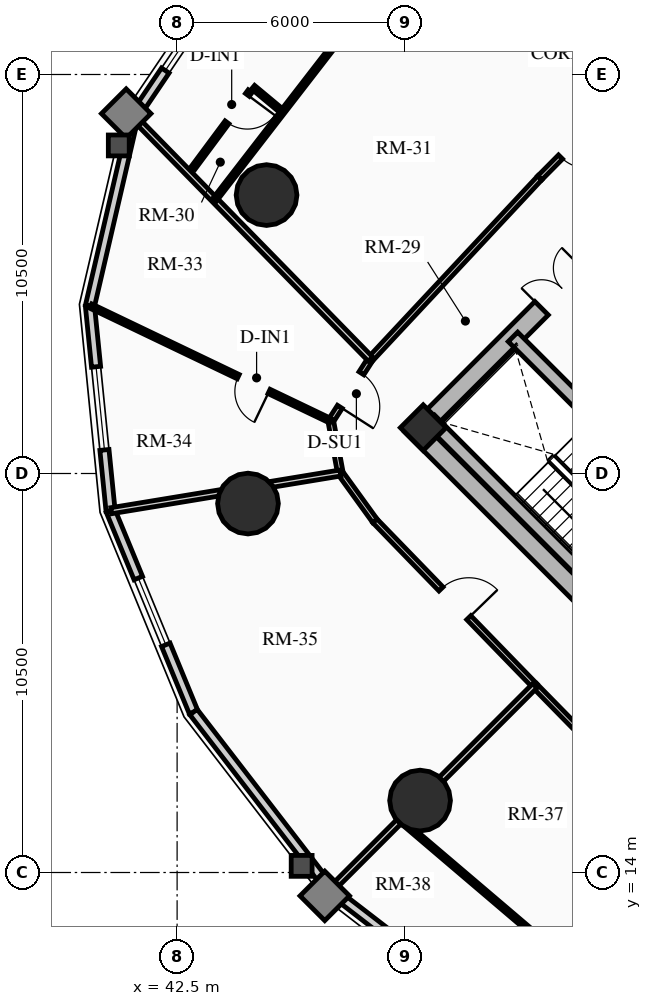
"""IFC4 building model, lengths in metres.
Left out: names, types, materials, properties, quantities, classifications, styles, units other than length and angle.
Written with IfcOpenShell. Run it as: python <this file> out.ifc"""

import sys

from ifc_helpers import new_model, si_unit, direction, frame, frame_2d, origin, origin_2d, place, context, subcontext, project, spatial, rectangle, circle, extrude, source, transform, mapped, element, fill, save


model = new_model("IFC4")
c1 = context("Model", 3, precision=1e-05, world=origin(), true_north=direction((0.0, 1.0)))
c2 = subcontext(c1, "Body", "Model", "MODEL_VIEW")
j1 = project(units=[si_unit("LENGTHUNIT", "METRE"), si_unit("PLANEANGLEUNIT", "RADIAN")], contexts=[c1])
p1 = place(None, origin())
s1 = spatial("IfcSite", under=j1, at=p1, CompositionType="ELEMENT")
p2 = place(p1, origin())
s2 = spatial("IfcBuilding", under=s1, at=p2, CompositionType="ELEMENT")
p3 = place(p2, frame((0.0, 0.0, 39.46)))
s3 = spatial("IfcBuildingStorey", under=s2, at=p3, CompositionType="ELEMENT", Elevation=39.46)
p4 = place(p3, frame((58.773, 15.661, 0.0), z_axis=(0.0, 0.0, 1.0), x_axis=(-0.707106781187, 0.707106781187, 0.0)))
e1 = element("IfcWall", 1, at=p4, inside=s3, PredefinedType="SHEAR", context=c2, shape_type="SweptSolid", body=[
    extrude(rectangle(XDim=14.3, YDim=0.5, at=frame_2d((7.15, 0.0))), origin(), (0.0, 0.0, 1.0), 2.91),
])
p5 = place(p3, frame((48.838, 25.596, 0.0), z_axis=(0.0, 0.0, 1.0), x_axis=(0.707106781187, 0.707106781187, 0.0)))
e2 = element("IfcWall", 2, at=p5, inside=s3, PredefinedType="SHEAR", context=c2, shape_type="SweptSolid", body=[
    extrude(rectangle(XDim=10.7, YDim=0.5, at=frame_2d((5.35, 0.0))), origin(), (0.0, 0.0, 1.0), 2.91),
])
m1 = source(origin(), c2, "Body", "SweptSolid", [
    extrude(rectangle(XDim=1.5, YDim=2.02, at=frame_2d((0.75, 1.01))), frame((0.0, 0.26, 0.0), z_axis=(0.0, -1.0, 0.0), x_axis=(1.0, 0.0, 0.0)), (0.0, 0.0, 1.0), 0.52),
])
p6 = place(p5, frame((4.6, 0.0, 0.0)))
e3 = element("IfcOpeningElement", 3, at=p6, cuts=e2, PredefinedType="OPENING", context=c2, shape_type="MappedRepresentation", body=[
    mapped(m1, transform((0.0, 0.0, 0.0), x_axis=(1.0, 0.0, 0.0), y_axis=(0.0, 1.0, 0.0), z_axis=(0.0, 0.0, 1.0), scale=1.0)),
])
p7 = place(p3, frame((61.096, 18.338, 0.0), z_axis=(0.0, 0.0, 1.0), x_axis=(-0.707106781187, 0.707106781187, 0.0)))
e4 = element("IfcWall", 4, at=p7, inside=s3, PredefinedType="SHEAR", context=c2, shape_type="SweptSolid", body=[
    extrude(rectangle(XDim=13.8, YDim=0.35, at=frame_2d((6.9, 0.0))), origin(), (0.0, 0.0, 1.0), 2.91),
])
m2 = source(origin(), c2, "Body", "SweptSolid", [
    extrude(rectangle(XDim=1.1, YDim=2.015, at=frame_2d((0.55, 1.007))), frame((0.0, 0.185, 0.0), z_axis=(0.0, -1.0, 0.0), x_axis=(1.0, 0.0, 0.0)), (0.0, 0.0, 1.0), 0.37),
])
p8 = place(p7, frame((4.9, 0.0, 0.0)))
e5 = element("IfcOpeningElement", 5, at=p8, cuts=e4, PredefinedType="OPENING", context=c2, shape_type="MappedRepresentation", body=[
    mapped(m2, transform((0.0, 0.0, 0.0), x_axis=(1.0, 0.0, 0.0), y_axis=(0.0, 1.0, 0.0), z_axis=(0.0, 0.0, 1.0), scale=1.0)),
])
m3 = source(origin(), c2, "Body", "SweptSolid", [
    extrude(rectangle(XDim=1.15, YDim=2.02, at=frame_2d((0.575, 1.01))), frame((0.0, 0.185, 0.0), z_axis=(0.0, -1.0, 0.0), x_axis=(1.0, 0.0, 0.0)), (0.0, 0.0, 1.0), 0.37),
])
p9 = place(p7, frame((7.32, 0.0, 0.0)))
e6 = element("IfcOpeningElement", 6, at=p9, cuts=e4, PredefinedType="OPENING", context=c2, shape_type="MappedRepresentation", body=[
    mapped(m3, transform((0.0, 0.0, 0.0), x_axis=(1.0, 0.0, 0.0), y_axis=(0.0, 1.0, 0.0), z_axis=(0.0, 0.0, 1.0), scale=1.0)),
])
p10 = place(p3, frame((53.922, 21.141, 0.0), z_axis=(0.0, 0.0, 1.0), x_axis=(-0.707106781187, 0.707106781187, 0.0)))
e7 = element("IfcWall", 7, at=p10, inside=s3, PredefinedType="SHEAR", context=c2, shape_type="SweptSolid", body=[
    extrude(rectangle(XDim=6.745, YDim=0.35, at=frame_2d((3.373, 0.0))), origin(), (0.0, 0.0, 1.0), 2.91),
])
p11 = place(p3, frame((48.976, 25.706, 0.0), z_axis=(0.0, 0.0, 1.0), x_axis=(0.707106781187, 0.707106781187, 0.0)))
e8 = element("IfcColumn", 8, at=p11, inside=s3, PredefinedType="COLUMN", context=c2, shape_type="SweptSolid", body=[
    extrude(rectangle(XDim=0.85, YDim=0.85, at=origin_2d()), origin(), (0.0, 0.0, 1.0), 2.91),
])
for number, where, z_axis, x_axis in (
    (9, (44.854, 31.827, 0.0), (0.0, 0.0, 1.0), (1.0, 0.0, 0.0)),
    (10, (44.365, 23.709, 0.0), (0.0, 0.0, 1.0), (1.0, 0.0, 0.0)),
    (11, (48.893, 15.893, 0.0), (0.0, 0.0, 1.0), (1.0, 0.0, 0.0)),
):
    element("IfcColumn", number, at=place(p3, frame(where, z_axis=z_axis, x_axis=x_axis)), inside=s3, PredefinedType="USERDEFINED", context=c2, shape_type="SweptSolid", body=[
        extrude(circle(Radius=0.8, at=origin_2d()), origin(), (0.0, 0.0, 1.0), 2.91),
    ])
p12 = place(p3, frame((41.356, 33.871, 0.0), z_axis=(0.0, 0.0, 1.0), x_axis=(0.559621532896, 0.828748297084, 0.0)))
e12 = element("IfcWall", 12, at=p12, inside=s3, PredefinedType="SOLIDWALL", context=c2, shape_type="SweptSolid", body=[
    extrude(rectangle(XDim=4.879, YDim=0.24, at=frame_2d((2.439, 0.0))), origin(), (0.0, 0.0, 1.0), 2.073),
])
m4 = source(origin(), c2, "Body", "SweptSolid", [
    extrude(rectangle(XDim=1.9, YDim=1.35, at=frame_2d((0.95, 0.675))), frame((0.0, 0.13, 0.0), z_axis=(0.0, -1.0, 0.0), x_axis=(1.0, 0.0, 0.0)), (0.0, 0.0, 1.0), 0.26),
])
p13 = place(p12, frame((1.489, 0.0, 0.65)))
e13 = element("IfcOpeningElement", 13, at=p13, cuts=e12, PredefinedType="OPENING", context=c2, shape_type="MappedRepresentation", body=[
    mapped(m4, transform((0.0, 0.0, 0.0), x_axis=(1.0, 0.0, 0.0), y_axis=(0.0, 1.0, 0.0), z_axis=(0.0, 0.0, 1.0), scale=1.0)),
])
p14 = place(p3, frame((40.206, 28.91, 0.0), z_axis=(0.0, 0.0, 1.0), x_axis=(0.22582585901, 0.974167686491, 0.0)))
e14 = element("IfcWall", 14, at=p14, inside=s3, PredefinedType="SOLIDWALL", context=c2, shape_type="SweptSolid", body=[
    extrude(rectangle(XDim=5.092, YDim=0.24, at=frame_2d((2.546, 0.0))), origin(), (0.0, 0.0, 1.0), 2.073),
])
p15 = place(p3, frame((40.749, 23.518, 0.0), z_axis=(0.0, 0.0, 1.0), x_axis=(-0.100190592135, 0.994968263437, 0.0)))
e15 = element("IfcWall", 15, at=p15, inside=s3, PredefinedType="SOLIDWALL", context=c2, shape_type="SweptSolid", body=[
    extrude(rectangle(XDim=5.419, YDim=0.24, at=frame_2d((2.71, 0.0))), origin(), (0.0, 0.0, 1.0), 2.073),
])
m5 = source(origin(), c2, "Body", "SweptSolid", [
    extrude(rectangle(XDim=2.2, YDim=1.35, at=frame_2d((1.1, 0.675))), frame((0.0, 0.13, 0.0), z_axis=(0.0, -1.0, 0.0), x_axis=(1.0, 0.0, 0.0)), (0.0, 0.0, 1.0), 0.26),
])
p16 = place(p15, frame((1.61, 0.0, 0.65)))
e16 = element("IfcOpeningElement", 16, at=p16, cuts=e15, PredefinedType="OPENING", context=c2, shape_type="MappedRepresentation", body=[
    mapped(m5, transform((0.0, 0.0, 0.0), x_axis=(1.0, 0.0, 0.0), y_axis=(0.0, 1.0, 0.0), z_axis=(0.0, 0.0, 1.0), scale=1.0)),
])
p17 = place(p3, frame((42.932, 18.222, 0.0), z_axis=(0.0, 0.0, 1.0), x_axis=(-0.381077764176, 0.924542988536, 0.0)))
e17 = element("IfcWall", 17, at=p17, inside=s3, PredefinedType="SOLIDWALL", context=c2, shape_type="SweptSolid", body=[
    extrude(rectangle(XDim=5.728, YDim=0.24, at=frame_2d((2.864, 0.0))), origin(), (0.0, 0.0, 1.0), 2.073),
])
p18 = place(p17, frame((1.914, 0.0, 0.65)))
e18 = element("IfcOpeningElement", 18, at=p18, cuts=e17, PredefinedType="OPENING", context=c2, shape_type="MappedRepresentation", body=[
    mapped(m4, transform((0.0, 0.0, 0.0), x_axis=(1.0, 0.0, 0.0), y_axis=(0.0, 1.0, 0.0), z_axis=(0.0, 0.0, 1.0), scale=1.0)),
])
p19 = place(p3, frame((46.541, 13.541, 0.0), z_axis=(0.0, 0.0, 1.0), x_axis=(-0.610494906082, 0.792020182601, 0.0)))
e19 = element("IfcWall", 19, at=p19, inside=s3, PredefinedType="SOLIDWALL", context=c2, shape_type="SweptSolid", body=[
    extrude(rectangle(XDim=5.911, YDim=0.24, at=frame_2d((2.956, 0.0))), origin(), (0.0, 0.0, 1.0), 2.073),
])
p20 = place(p3, frame((51.222, 9.932, 0.0), z_axis=(0.0, 0.0, 1.0), x_axis=(-0.792020182601, 0.610494906082, 0.0)))
e20 = element("IfcWall", 20, at=p20, inside=s3, PredefinedType="SOLIDWALL", context=c2, shape_type="SweptSolid", body=[
    extrude(rectangle(XDim=5.911, YDim=0.24, at=frame_2d((2.956, 0.0))), origin(), (0.0, 0.0, 1.0), 2.073),
])
p21 = place(p20, frame((1.855, 0.0, 0.65)))
e21 = element("IfcOpeningElement", 21, at=p21, cuts=e20, PredefinedType="OPENING", context=c2, shape_type="MappedRepresentation", body=[
    mapped(m5, transform((0.0, 0.0, 0.0), x_axis=(1.0, 0.0, 0.0), y_axis=(0.0, 1.0, 0.0), z_axis=(0.0, 0.0, 1.0), scale=1.0)),
])
p22 = place(p3, frame((54.427, 34.683, 0.0), z_axis=(0.0, 0.0, 1.0), x_axis=(-0.704178989986, -0.710022499687, 0.0)))
e22 = element("IfcWall", 22, at=p22, inside=s3, PredefinedType="PARTITIONING", context=c2, shape_type="SweptSolid", body=[
    extrude(rectangle(XDim=3.384, YDim=0.15, at=frame_2d((1.692, 0.0))), origin(), (0.0, 0.0, 1.0), 2.159),
])
m6 = source(origin(), c2, "Body", "SweptSolid", [
    extrude(rectangle(XDim=1.05, YDim=2.015, at=frame_2d((0.525, 1.007))), frame((0.0, 0.085, 0.0), z_axis=(0.0, -1.0, 0.0), x_axis=(1.0, 0.0, 0.0)), (0.0, 0.0, 1.0), 0.17),
])
p23 = place(p22, frame((1.56, 0.0, 0.0)))
e23 = element("IfcOpeningElement", 23, at=p23, cuts=e22, PredefinedType="OPENING", context=c2, shape_type="MappedRepresentation", body=[
    mapped(m6, transform((0.0, 0.0, 0.0), x_axis=(1.0, 0.0, 0.0), y_axis=(0.0, 1.0, 0.0), z_axis=(0.0, 0.0, 1.0), scale=1.0)),
])
p24 = place(p3, frame((52.043, 32.28, 0.0), z_axis=(0.0, 0.0, 1.0), x_axis=(-0.682606081633, -0.730786519661, 0.0)))
e24 = element("IfcWall", 24, at=p24, inside=s3, PredefinedType="PARTITIONING", context=c2, shape_type="SweptSolid", body=[
    extrude(rectangle(XDim=6.527, YDim=0.15, at=frame_2d((3.263, 0.0))), origin(), (0.0, 0.0, 1.0), 2.159),
])
p25 = place(p3, frame((47.588, 27.51, 0.0), z_axis=(0.0, 0.0, 1.0), x_axis=(-0.540202619347, -0.841534984449, 0.0)))
e25 = element("IfcWall", 25, at=p25, inside=s3, PredefinedType="PARTITIONING", context=c2, shape_type="SweptSolid", body=[
    extrude(rectangle(XDim=1.935, YDim=0.15, at=frame_2d((0.967, 0.0))), origin(), (0.0, 0.0, 1.0), 2.159),
])
p26 = place(p25, frame((0.442, 0.0, 0.0)))
e26 = element("IfcOpeningElement", 26, at=p26, cuts=e25, PredefinedType="OPENING", context=c2, shape_type="MappedRepresentation", body=[
    mapped(m6, transform((0.0, 0.0, 0.0), x_axis=(1.0, 0.0, 0.0), y_axis=(0.0, 1.0, 0.0), z_axis=(0.0, 0.0, 1.0), scale=1.0)),
])
p27 = place(p3, frame((46.543, 25.882, 0.0), z_axis=(0.0, 0.0, 1.0), x_axis=(0.181153502579, -0.983454832976, 0.0)))
e27 = element("IfcWall", 27, at=p27, inside=s3, PredefinedType="PARTITIONING", context=c2, shape_type="SweptSolid", body=[
    extrude(rectangle(XDim=1.392, YDim=0.15, at=frame_2d((0.696, 0.0))), origin(), (0.0, 0.0, 1.0), 2.159),
])
p28 = place(p3, frame((46.795, 24.513, 0.0), z_axis=(0.0, 0.0, 1.0), x_axis=(0.585628197524, -0.810579801294, 0.0)))
e28 = element("IfcWall", 28, at=p28, inside=s3, PredefinedType="PARTITIONING", context=c2, shape_type="SweptSolid", body=[
    extrude(rectangle(XDim=1.554, YDim=0.15, at=frame_2d((0.777, 0.0))), origin(), (0.0, 0.0, 1.0), 2.205),
])
p29 = place(p3, frame((47.706, 23.253, 0.0), z_axis=(0.0, 0.0, 1.0), x_axis=(0.696179266346, -0.717867974707, 0.0)))
e29 = element("IfcWall", 29, at=p29, inside=s3, PredefinedType="PARTITIONING", context=c2, shape_type="SweptSolid", body=[
    extrude(rectangle(XDim=6.045, YDim=0.15, at=frame_2d((3.022, 0.0))), origin(), (0.0, 0.0, 1.0), 2.635),
])
p30 = place(p29, frame((2.497, 0.0, 0.0)))
e30 = element("IfcOpeningElement", 30, at=p30, cuts=e29, PredefinedType="OPENING", context=c2, shape_type="MappedRepresentation", body=[
    mapped(m6, transform((0.0, 0.0, 0.0), x_axis=(1.0, 0.0, 0.0), y_axis=(0.0, 1.0, 0.0), z_axis=(0.0, 0.0, 1.0), scale=1.0)),
])
p31 = place(p3, frame((51.914, 18.914, 0.0), z_axis=(0.0, 0.0, 1.0), x_axis=(0.699999313799, -0.714143515465, 0.0)))
e31 = element("IfcWall", 31, at=p31, inside=s3, PredefinedType="PARTITIONING", context=c2, shape_type="SweptSolid", body=[
    extrude(rectangle(XDim=6.162, YDim=0.15, at=frame_2d((3.081, 0.0))), origin(), (0.0, 0.0, 1.0), 2.159),
])
p32 = place(p3, frame((47.588, 27.51, 0.0), z_axis=(0.0, 0.0, 1.0), x_axis=(-0.699371977892, 0.714757886657, 0.0)))
e32 = element("IfcWall", 32, at=p32, inside=s3, PredefinedType="PARTITIONING", context=c2, shape_type="SweptSolid", body=[
    extrude(rectangle(XDim=8.886, YDim=0.16, at=frame_2d((4.443, 0.0))), origin(), (0.0, 0.0, 1.0), 2.073),
])
p33 = place(p3, frame((46.795, 24.513, 0.0), z_axis=(0.0, 0.0, 1.0), x_axis=(-0.986729986004, -0.162369746937, 0.0)))
e33 = element("IfcWall", 33, at=p33, inside=s3, PredefinedType="PARTITIONING", context=c2, shape_type="SweptSolid", body=[
    extrude(rectangle(XDim=6.108, YDim=0.16, at=frame_2d((3.054, 0.0))), origin(), (0.0, 0.0, 1.0), 2.073),
])
p34 = place(p3, frame((51.914, 18.914, 0.0), z_axis=(0.0, 0.0, 1.0), x_axis=(-0.707106781187, -0.707106781187, 0.0)))
e34 = element("IfcWall", 34, at=p34, inside=s3, PredefinedType="PARTITIONING", context=c2, shape_type="SweptSolid", body=[
    extrude(rectangle(XDim=7.579, YDim=0.16, at=frame_2d((3.79, 0.0))), origin(), (0.0, 0.0, 1.0), 2.073),
])
p35 = place(p3, frame((46.801, 35.989, 0.0), z_axis=(0.0, 0.0, 1.0), x_axis=(-0.611635984749, -0.791139319058, 0.0)))
e35 = element("IfcWall", 35, at=p35, inside=s3, PredefinedType="PARTITIONING", context=c2, shape_type="SweptSolid", body=[
    extrude(rectangle(XDim=5.419, YDim=0.125, at=frame_2d((2.709, 0.0))), origin(), (0.0, 0.0, 1.0), 2.159),
])
p36 = place(p3, frame((45.204, 34.078, 0.0), z_axis=(0.0, 0.0, 1.0), x_axis=(-0.768330339969, 0.640053504547, 0.0)))
e36 = element("IfcWall", 36, at=p36, inside=s3, PredefinedType="PARTITIONING", context=c2, shape_type="SweptSolid", body=[
    extrude(rectangle(XDim=0.917, YDim=0.125, at=frame_2d((0.458, 0.0))), origin(), (0.0, 0.0, 1.0), 2.635),
])
p37 = place(p3, frame((44.421, 34.56, 0.0), z_axis=(0.0, 0.0, 1.0), x_axis=(-0.596454407051, -0.802646958699, 0.0)))
e37 = element("IfcWall", 37, at=p37, inside=s3, PredefinedType="PARTITIONING", context=c2, shape_type="SweptSolid", body=[
    extrude(rectangle(XDim=2.516, YDim=0.125, at=frame_2d((1.258, 0.0))), origin(), (0.0, 0.0, 1.0), 2.159),
])
m7 = source(origin(), c2, "Body", "SweptSolid", [
    extrude(rectangle(XDim=0.9, YDim=2.005, at=frame_2d((0.45, 1.002))), frame((0.0, 0.073, 0.0), z_axis=(0.0, -1.0, 0.0), x_axis=(1.0, 0.0, 0.0)), (0.0, 0.0, 1.0), 0.145),
])
p38 = place(p37, frame((0.12, 0.0, 0.0)))
e38 = element("IfcOpeningElement", 38, at=p38, cuts=e37, PredefinedType="OPENING", context=c2, shape_type="MappedRepresentation", body=[
    mapped(m7, transform((0.0, 0.0, 0.0), x_axis=(1.0, 0.0, 0.0), y_axis=(0.0, 1.0, 0.0), z_axis=(0.0, 0.0, 1.0), scale=1.0)),
])
p39 = place(p3, frame((46.543, 25.882, 0.0), z_axis=(0.0, 0.0, 1.0), x_axis=(-0.901937110034, 0.431867398103, 0.0)))
e39 = element("IfcWall", 39, at=p39, inside=s3, PredefinedType="PARTITIONING", context=c2, shape_type="SweptSolid", body=[
    extrude(rectangle(XDim=7.004, YDim=0.125, at=frame_2d((3.502, 0.0))), origin(), (0.0, 0.0, 1.0), 2.073),
])
p40 = place(p39, frame((1.8, 0.0, 0.0)))
e40 = element("IfcOpeningElement", 40, at=p40, cuts=e39, PredefinedType="OPENING", context=c2, shape_type="MappedRepresentation", body=[
    mapped(m7, transform((0.0, 0.0, 0.0), x_axis=(1.0, 0.0, 0.0), y_axis=(0.0, 1.0, 0.0), z_axis=(0.0, 0.0, 1.0), scale=1.0)),
])
p41 = place(p3, frame((48.377, 15.377, 0.0), z_axis=(0.0, 0.0, 1.0), x_axis=(0.761505943152, -0.648157927163, 0.0)))
e41 = element("IfcWall", 41, at=p41, inside=s3, PredefinedType="PARTITIONING", context=c2, shape_type="SweptSolid", body=[
    extrude(rectangle(XDim=5.979, YDim=0.125, at=frame_2d((2.99, 0.0))), origin(), (0.0, 0.0, 1.0), 2.635),
])
m8 = source(origin(), c2, "Body", "SweptSolid", [
    extrude(rectangle(XDim=1.9, YDim=1.35, at=frame_2d((0.95, 0.675))), frame((0.0, 0.03, 0.0), z_axis=(0.0, -1.0, 0.0), x_axis=(1.0, 0.0, 0.0)), (0.0, 0.0, 1.0), 0.06),
])
p42 = place(p13, origin())
e42 = element("IfcWindow", 42, at=p42, inside=s3, PartitioningType="DOUBLE_PANEL_VERTICAL", PredefinedType="WINDOW", context=c2, shape_type="MappedRepresentation", body=[
    mapped(m8, transform((0.0, 0.0, 0.0), x_axis=(1.0, 0.0, 0.0), y_axis=(0.0, 1.0, 0.0), z_axis=(0.0, 0.0, 1.0), scale=1.0)),
])
fill(e13, e42)
m9 = source(origin(), c2, "Body", "SweptSolid", [
    extrude(rectangle(XDim=2.2, YDim=1.35, at=frame_2d((1.1, 0.675))), frame((0.0, 0.03, 0.0), z_axis=(0.0, -1.0, 0.0), x_axis=(1.0, 0.0, 0.0)), (0.0, 0.0, 1.0), 0.06),
])
p43 = place(p16, origin())
e43 = element("IfcWindow", 43, at=p43, inside=s3, PartitioningType="DOUBLE_PANEL_VERTICAL", PredefinedType="WINDOW", context=c2, shape_type="MappedRepresentation", body=[
    mapped(m9, transform((0.0, 0.0, 0.0), x_axis=(1.0, 0.0, 0.0), y_axis=(0.0, 1.0, 0.0), z_axis=(0.0, 0.0, 1.0), scale=1.0)),
])
fill(e16, e43)
p44 = place(p18, origin())
e44 = element("IfcWindow", 44, at=p44, inside=s3, PartitioningType="DOUBLE_PANEL_VERTICAL", PredefinedType="WINDOW", context=c2, shape_type="MappedRepresentation", body=[
    mapped(m8, transform((0.0, 0.0, 0.0), x_axis=(1.0, 0.0, 0.0), y_axis=(0.0, 1.0, 0.0), z_axis=(0.0, 0.0, 1.0), scale=1.0)),
])
fill(e18, e44)
m10 = source(origin(), c2, "Body", "SweptSolid", [
    extrude(rectangle(XDim=1.5, YDim=2.02, at=frame_2d((0.75, 1.01))), frame((0.0, 0.025, 0.0), z_axis=(0.0, -1.0, 0.0), x_axis=(1.0, 0.0, 0.0)), (0.0, 0.0, 1.0), 0.05),
])
p45 = place(p6, origin())
e45 = element("IfcDoor", 45, at=p45, inside=s3, OperationType="DOUBLE_DOOR_SINGLE_SWING", PredefinedType="DOOR", context=c2, shape_type="MappedRepresentation", body=[
    mapped(m10, transform((0.0, 0.0, 0.0), x_axis=(1.0, 0.0, 0.0), y_axis=(0.0, 1.0, 0.0), z_axis=(0.0, 0.0, 1.0), scale=1.0)),
])
fill(e3, e45)
m11 = source(origin(), c2, "Body", "SweptSolid", [
    extrude(rectangle(XDim=1.05, YDim=2.015, at=frame_2d((0.525, 1.007))), frame((0.0, 0.025, 0.0), z_axis=(0.0, -1.0, 0.0), x_axis=(1.0, 0.0, 0.0)), (0.0, 0.0, 1.0), 0.05),
])
p46 = place(p23, origin())
e46 = element("IfcDoor", 46, at=p46, inside=s3, OperationType="SINGLE_SWING_LEFT", PredefinedType="DOOR", context=c2, shape_type="MappedRepresentation", body=[
    mapped(m11, transform((0.0, 0.0, 0.0), x_axis=(1.0, 0.0, 0.0), y_axis=(0.0, 1.0, 0.0), z_axis=(0.0, 0.0, 1.0), scale=1.0)),
])
fill(e23, e46)
m12 = source(origin(), c2, "Body", "SweptSolid", [
    extrude(rectangle(XDim=0.9, YDim=2.005, at=frame_2d((0.45, 1.002))), frame((0.0, 0.025, 0.0), z_axis=(0.0, -1.0, 0.0), x_axis=(1.0, 0.0, 0.0)), (0.0, 0.0, 1.0), 0.05),
])
p47 = place(p38, origin())
e47 = element("IfcDoor", 47, at=p47, inside=s3, OperationType="SINGLE_SWING_LEFT", PredefinedType="DOOR", context=c2, shape_type="MappedRepresentation", body=[
    mapped(m12, transform((0.0, 0.0, 0.0), x_axis=(1.0, 0.0, 0.0), y_axis=(0.0, 1.0, 0.0), z_axis=(0.0, 0.0, 1.0), scale=1.0)),
])
fill(e38, e47)
p48 = place(p26, origin())
e48 = element("IfcDoor", 48, at=p48, inside=s3, OperationType="SINGLE_SWING_RIGHT", PredefinedType="DOOR", context=c2, shape_type="MappedRepresentation", body=[
    mapped(m11, transform((0.0, 0.0, 0.0), x_axis=(1.0, 0.0, 0.0), y_axis=(0.0, 1.0, 0.0), z_axis=(0.0, 0.0, 1.0), scale=1.0)),
])
fill(e26, e48)
p49 = place(p40, origin())
e49 = element("IfcDoor", 49, at=p49, inside=s3, OperationType="SINGLE_SWING_LEFT", PredefinedType="DOOR", context=c2, shape_type="MappedRepresentation", body=[
    mapped(m12, transform((0.0, 0.0, 0.0), x_axis=(1.0, 0.0, 0.0), y_axis=(0.0, 1.0, 0.0), z_axis=(0.0, 0.0, 1.0), scale=1.0)),
])
fill(e40, e49)
p50 = place(p30, origin())
e50 = element("IfcDoor", 50, at=p50, inside=s3, OperationType="SINGLE_SWING_RIGHT", PredefinedType="DOOR", context=c2, shape_type="MappedRepresentation", body=[
    mapped(m11, transform((0.0, 0.0, 0.0), x_axis=(1.0, 0.0, 0.0), y_axis=(0.0, 1.0, 0.0), z_axis=(0.0, 0.0, 1.0), scale=1.0)),
])
fill(e30, e50)
save(model, sys.argv[1])
